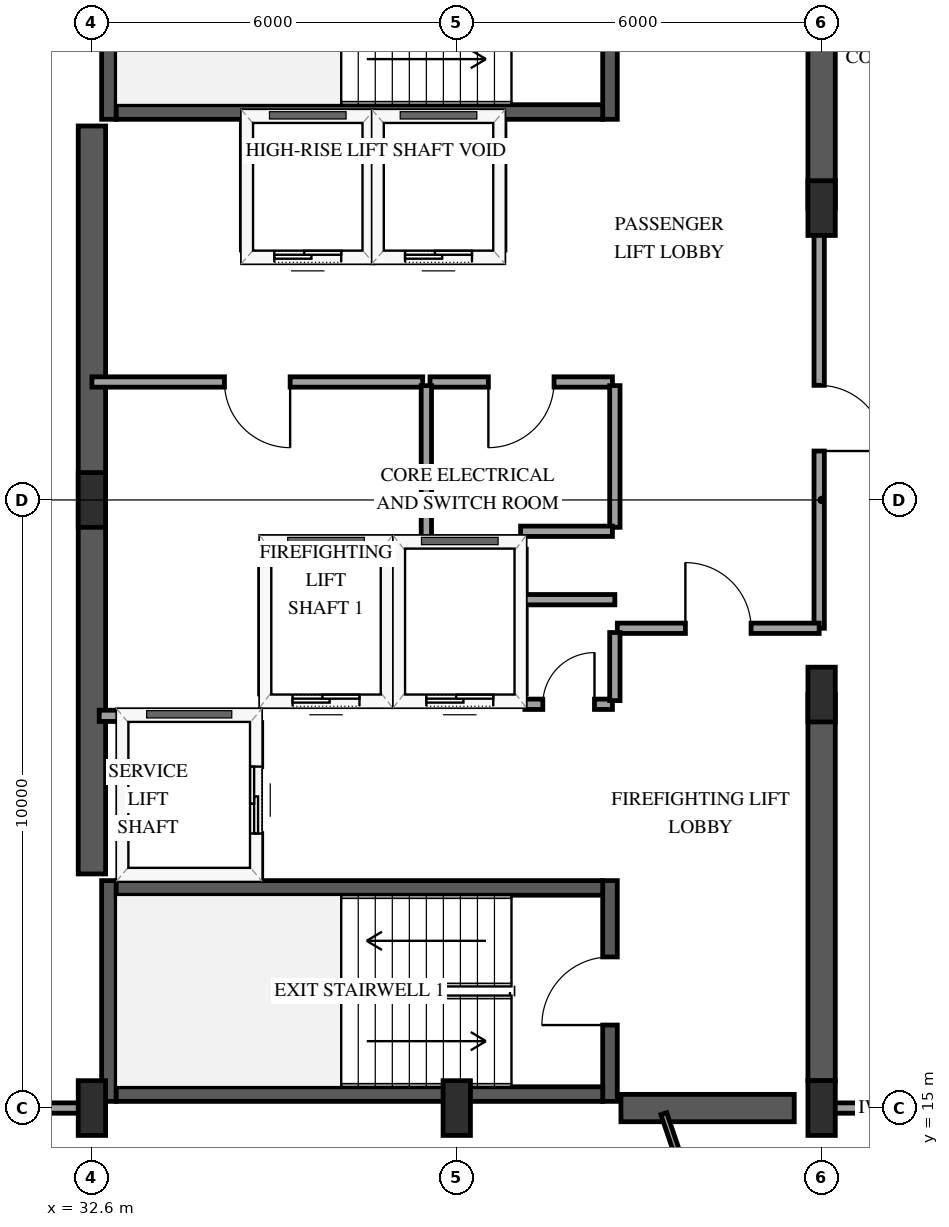
"""IFC4 building model, lengths in metres.
Left out: names, types, materials, properties, quantities, classifications, styles, units other than length and angle.
Written with IfcOpenShell. Run it as: python <this file> out.ifc"""

import sys

from ifc_helpers import new_model, si_unit, direction, frame, frame_2d, origin, origin_2d, place, context, subcontext, project, spatial, rectangle, extrude, element, fill, save


model = new_model("IFC4")
c1 = context("Model", 3, precision=1e-05, world=origin(), true_north=direction((0.0, 1.0)))
c2 = subcontext(c1, "Body", "Model", "MODEL_VIEW")
j1 = project(units=[si_unit("LENGTHUNIT", "METRE"), si_unit("PLANEANGLEUNIT", "RADIAN")], contexts=[c1])
p1 = place(None, origin())
s1 = spatial("IfcSite", under=j1, at=p1, CompositionType="ELEMENT")
p2 = place(p1, origin())
s2 = spatial("IfcBuilding", under=s1, at=p2, CompositionType="ELEMENT")
p3 = place(p2, frame((0.0, 0.0, 276.25)))
s3 = spatial("IfcBuildingStorey", under=s2, at=p3, CompositionType="ELEMENT", Elevation=276.25)
p4 = place(p3, frame((32.88, 15.11, 0.0), z_axis=(0.0, 0.0, 1.0), x_axis=(0.0, 1.0, 0.0)))
e1 = element("IfcWall", 1, at=p4, inside=s3, PredefinedType="SHEAR", context=c2, shape_type="SweptSolid", body=[
    extrude(rectangle(XDim=3.63, YDim=0.24, at=frame_2d((1.815, 0.0))), origin(), (0.0, 0.0, 1.0), 3.75),
])
p5 = place(p3, frame((41.12, 15.11, 0.0), z_axis=(0.0, 0.0, 1.0), x_axis=(0.0, 1.0, 0.0)))
e2 = element("IfcWall", 2, at=p5, inside=s3, PredefinedType="SHEAR", context=c2, shape_type="SweptSolid", body=[
    extrude(rectangle(XDim=3.63, YDim=0.24, at=frame_2d((1.815, 0.0))), origin(), (0.0, 0.0, 1.0), 3.75),
])
p6 = place(p5, frame((1.255, 0.0, 0.0)))
e3 = element("IfcOpeningElement", 3, at=p6, cuts=e2, PredefinedType="OPENING", context=c2, shape_type="SweptSolid", body=[
    extrude(rectangle(XDim=1.12, YDim=2.15, at=frame_2d((0.56, 1.075))), frame((0.0, 0.13, 0.0), z_axis=(0.0, -1.0, 0.0), x_axis=(1.0, 0.0, 0.0)), (0.0, 0.0, 1.0), 0.26),
])
for number, where, z_axis, x_axis in (
    (4, (33.0, 15.23, 0.0), (0.0, 0.0, 1.0), (1.0, 0.0, 0.0)),
    (5, (33.0, 18.62, 0.0), (0.0, 0.0, 1.0), (1.0, 0.0, 0.0)),
):
    element("IfcWall", number, at=place(p3, frame(where, z_axis=z_axis, x_axis=x_axis)), inside=s3, PredefinedType="SHEAR", context=c2, shape_type="SweptSolid", body=[
        extrude(rectangle(XDim=8.0, YDim=0.24, at=frame_2d((4.0, 0.0))), origin(), (0.0, 0.0, 1.0), 3.75),
    ])
p7 = place(p3, frame((32.88, 31.26, 0.0), z_axis=(0.0, 0.0, 1.0), x_axis=(0.0, 1.0, 0.0)))
e6 = element("IfcWall", 6, at=p7, inside=s3, PredefinedType="SHEAR", context=c2, shape_type="SweptSolid", body=[
    extrude(rectangle(XDim=3.63, YDim=0.24, at=frame_2d((1.815, 0.0))), origin(), (0.0, 0.0, 1.0), 3.75),
])
p8 = place(p3, frame((41.12, 31.26, 0.0), z_axis=(0.0, 0.0, 1.0), x_axis=(0.0, 1.0, 0.0)))
e7 = element("IfcWall", 7, at=p8, inside=s3, PredefinedType="SHEAR", context=c2, shape_type="SweptSolid", body=[
    extrude(rectangle(XDim=3.63, YDim=0.24, at=frame_2d((1.815, 0.0))), origin(), (0.0, 0.0, 1.0), 3.75),
])
p9 = place(p8, frame((1.255, 0.0, 0.0)))
e8 = element("IfcOpeningElement", 8, at=p9, cuts=e7, PredefinedType="OPENING", context=c2, shape_type="SweptSolid", body=[
    extrude(rectangle(XDim=1.12, YDim=2.15, at=frame_2d((0.56, 1.075))), frame((0.0, 0.13, 0.0), z_axis=(0.0, -1.0, 0.0), x_axis=(1.0, 0.0, 0.0)), (0.0, 0.0, 1.0), 0.26),
])
p10 = place(p3, frame((33.0, 31.38, 0.0), z_axis=(0.0, 0.0, 1.0), x_axis=(1.0, 0.0, 0.0)))
e9 = element("IfcWall", 9, at=p10, inside=s3, PredefinedType="SHEAR", context=c2, shape_type="SweptSolid", body=[
    extrude(rectangle(XDim=8.0, YDim=0.24, at=frame_2d((4.0, 0.0))), origin(), (0.0, 0.0, 1.0), 3.75),
])
p11 = place(p3, frame((32.6, 18.85, 0.0), z_axis=(0.0, 0.0, 1.0), x_axis=(0.0, 1.0, 0.0)))
e10 = element("IfcWall", 10, at=p11, inside=s3, PredefinedType="SHEAR", context=c2, shape_type="SweptSolid", body=[
    extrude(rectangle(XDim=12.3, YDim=0.45, at=frame_2d((6.15, 0.0))), origin(), (0.0, 0.0, 1.0), 3.75),
])
p12 = place(p3, frame((41.3, 15.0, 0.0), z_axis=(0.0, 0.0, 1.0), x_axis=(1.0, 0.0, 0.0)))
e11 = element("IfcWall", 11, at=p12, inside=s3, PredefinedType="SHEAR", context=c2, shape_type="SweptSolid", body=[
    extrude(rectangle(XDim=2.85, YDim=0.45, at=frame_2d((1.425, 0.0))), origin(), (0.0, 0.0, 1.0), 3.75),
])
p13 = place(p3, frame((44.6, 15.45, 0.0), z_axis=(0.0, 0.0, 1.0), x_axis=(0.0, 1.0, 0.0)))
e12 = element("IfcWall", 12, at=p13, inside=s3, PredefinedType="SHEAR", context=c2, shape_type="SweptSolid", body=[
    extrude(rectangle(XDim=6.35, YDim=0.45, at=frame_2d((3.175, 0.0))), origin(), (0.0, 0.0, 1.0), 3.75),
])
p14 = place(p3, frame((44.6, 29.8, 0.0), z_axis=(0.0, 0.0, 1.0), x_axis=(0.0, 1.0, 0.0)))
e13 = element("IfcWall", 13, at=p14, inside=s3, PredefinedType="SHEAR", context=c2, shape_type="SweptSolid", body=[
    extrude(rectangle(XDim=4.75, YDim=0.45, at=frame_2d((2.375, 0.0))), origin(), (0.0, 0.0, 1.0), 3.75),
])
for number, where, z_axis, x_axis in (
    (14, (32.6, 15.0, 0.0), (0.0, 0.0, 1.0), (1.0, 0.0, 0.0)),
    (15, (32.6, 25.0, 0.0), (0.0, 0.0, 1.0), (1.0, 0.0, 0.0)),
    (16, (38.6, 15.0, 0.0), (0.0, 0.0, 1.0), (1.0, 0.0, 0.0)),
    (17, (44.6, 15.0, 0.0), (0.0, 0.0, 1.0), (1.0, 0.0, 0.0)),
    (18, (44.6, 21.8, 0.0), (0.0, 0.0, 1.0), (1.0, 0.0, 0.0)),
    (19, (44.6, 29.8, 0.0), (0.0, 0.0, 1.0), (1.0, 0.0, 0.0)),
):
    element("IfcColumn", number, at=place(p3, frame(where, z_axis=z_axis, x_axis=x_axis)), inside=s3, PredefinedType="PILASTER", context=c2, shape_type="SweptSolid", body=[
        extrude(rectangle(XDim=0.45, YDim=0.9, at=origin_2d()), origin(), (0.0, 0.0, 1.0), 3.75),
    ])
p15 = place(p3, frame((35.45, 21.7, 0.0), z_axis=(0.0, 0.0, 1.0), x_axis=(1.0, 0.0, 0.0)))
e20 = element("IfcWall", 20, at=p15, inside=s3, PredefinedType="SOLIDWALL", context=c2, shape_type="SweptSolid", body=[
    extrude(rectangle(XDim=2.0, YDim=0.185, at=frame_2d((1.0, 0.0))), origin(), (0.0, 0.0, 1.0), 3.45),
])
p16 = place(p15, frame((0.45, 0.0, 0.0)))
e21 = element("IfcOpeningElement", 21, at=p16, cuts=e20, PredefinedType="OPENING", context=c2, shape_type="SweptSolid", body=[
    extrude(rectangle(XDim=1.1, YDim=2.15, at=frame_2d((0.55, 1.075))), frame((0.0, 0.103, 0.0), z_axis=(0.0, -1.0, 0.0), x_axis=(1.0, 0.0, 0.0)), (0.0, 0.0, 1.0), 0.205),
])
p17 = place(p3, frame((35.45, 24.3, 0.0), z_axis=(0.0, 0.0, 1.0), x_axis=(1.0, 0.0, 0.0)))
e22 = element("IfcWall", 22, at=p17, inside=s3, PredefinedType="SOLIDWALL", context=c2, shape_type="SweptSolid", body=[
    extrude(rectangle(XDim=2.0, YDim=0.185, at=frame_2d((1.0, 0.0))), origin(), (0.0, 0.0, 1.0), 3.45),
])
for number, where, z_axis, x_axis in (
    (23, (35.45, 21.81, 0.0), (0.0, 0.0, 1.0), (0.0, 1.0, 0.0)),
    (24, (37.45, 21.81, 0.0), (0.0, 0.0, 1.0), (0.0, 1.0, 0.0)),
):
    element("IfcWall", number, at=place(p3, frame(where, z_axis=z_axis, x_axis=x_axis)), inside=s3, PredefinedType="SOLIDWALL", context=c2, shape_type="SweptSolid", body=[
        extrude(rectangle(XDim=2.38, YDim=0.185, at=frame_2d((1.19, 0.0))), origin(), (0.0, 0.0, 1.0), 3.45),
    ])
p18 = place(p3, frame((37.65, 21.7, 0.0), z_axis=(0.0, 0.0, 1.0), x_axis=(1.0, 0.0, 0.0)))
e25 = element("IfcWall", 25, at=p18, inside=s3, PredefinedType="SOLIDWALL", context=c2, shape_type="SweptSolid", body=[
    extrude(rectangle(XDim=2.0, YDim=0.185, at=frame_2d((1.0, 0.0))), origin(), (0.0, 0.0, 1.0), 3.45),
])
p19 = place(p18, frame((0.45, 0.0, 0.0)))
e26 = element("IfcOpeningElement", 26, at=p19, cuts=e25, PredefinedType="OPENING", context=c2, shape_type="SweptSolid", body=[
    extrude(rectangle(XDim=1.1, YDim=2.15, at=frame_2d((0.55, 1.075))), frame((0.0, 0.103, 0.0), z_axis=(0.0, -1.0, 0.0), x_axis=(1.0, 0.0, 0.0)), (0.0, 0.0, 1.0), 0.205),
])
p20 = place(p3, frame((37.65, 24.3, 0.0), z_axis=(0.0, 0.0, 1.0), x_axis=(1.0, 0.0, 0.0)))
e27 = element("IfcWall", 27, at=p20, inside=s3, PredefinedType="SOLIDWALL", context=c2, shape_type="SweptSolid", body=[
    extrude(rectangle(XDim=2.0, YDim=0.185, at=frame_2d((1.0, 0.0))), origin(), (0.0, 0.0, 1.0), 3.45),
])
p21 = place(p3, frame((39.65, 21.81, 0.0), z_axis=(0.0, 0.0, 1.0), x_axis=(0.0, 1.0, 0.0)))
e28 = element("IfcWall", 28, at=p21, inside=s3, PredefinedType="SOLIDWALL", context=c2, shape_type="SweptSolid", body=[
    extrude(rectangle(XDim=2.38, YDim=0.185, at=frame_2d((1.19, 0.0))), origin(), (0.0, 0.0, 1.0), 3.45),
])
p22 = place(p3, frame((32.72, 21.45, 0.0), z_axis=(0.0, 0.0, 1.0), x_axis=(1.0, 0.0, 0.0)))
e29 = element("IfcWall", 29, at=p22, inside=s3, PredefinedType="SOLIDWALL", context=c2, shape_type="SweptSolid", body=[
    extrude(rectangle(XDim=2.58, YDim=0.185, at=frame_2d((1.29, 0.0))), origin(), (0.0, 0.0, 1.0), 3.45),
])
p23 = place(p3, frame((35.3, 18.79, 0.0), z_axis=(0.0, 0.0, 1.0), x_axis=(0.0, 1.0, 0.0)))
e30 = element("IfcWall", 30, at=p23, inside=s3, PredefinedType="SOLIDWALL", context=c2, shape_type="SweptSolid", body=[
    extrude(rectangle(XDim=2.55, YDim=0.185, at=frame_2d((1.275, 0.0))), origin(), (0.0, 0.0, 1.0), 3.45),
])
p24 = place(p23, frame((0.725, 0.0, 0.0)))
e31 = element("IfcOpeningElement", 31, at=p24, cuts=e30, PredefinedType="OPENING", context=c2, shape_type="SweptSolid", body=[
    extrude(rectangle(XDim=1.1, YDim=2.15, at=frame_2d((0.55, 1.075))), frame((0.0, 0.103, 0.0), z_axis=(0.0, -1.0, 0.0), x_axis=(1.0, 0.0, 0.0)), (0.0, 0.0, 1.0), 0.205),
])
p25 = place(p3, frame((35.15, 29.0, 0.0), z_axis=(0.0, 0.0, 1.0), x_axis=(1.0, 0.0, 0.0)))
e32 = element("IfcWall", 32, at=p25, inside=s3, PredefinedType="SOLIDWALL", context=c2, shape_type="SweptSolid", body=[
    extrude(rectangle(XDim=2.0, YDim=0.185, at=frame_2d((1.0, 0.0))), origin(), (0.0, 0.0, 1.0), 3.45),
])
p26 = place(p25, frame((0.45, 0.0, 0.0)))
e33 = element("IfcOpeningElement", 33, at=p26, cuts=e32, PredefinedType="OPENING", context=c2, shape_type="SweptSolid", body=[
    extrude(rectangle(XDim=1.1, YDim=2.15, at=frame_2d((0.55, 1.075))), frame((0.0, 0.103, 0.0), z_axis=(0.0, -1.0, 0.0), x_axis=(1.0, 0.0, 0.0)), (0.0, 0.0, 1.0), 0.205),
])
for number, where, z_axis, x_axis in (
    (34, (35.15, 29.11, 0.0), (0.0, 0.0, 1.0), (0.0, 1.0, 0.0)),
    (35, (37.15, 29.11, 0.0), (0.0, 0.0, 1.0), (0.0, 1.0, 0.0)),
):
    element("IfcWall", number, at=place(p3, frame(where, z_axis=z_axis, x_axis=x_axis)), inside=s3, PredefinedType="SOLIDWALL", context=c2, shape_type="SweptSolid", body=[
        extrude(rectangle(XDim=2.1, YDim=0.185, at=frame_2d((1.05, 0.0))), origin(), (0.0, 0.0, 1.0), 3.45),
    ])
p27 = place(p3, frame((37.3, 29.0, 0.0), z_axis=(0.0, 0.0, 1.0), x_axis=(1.0, 0.0, 0.0)))
e36 = element("IfcWall", 36, at=p27, inside=s3, PredefinedType="SOLIDWALL", context=c2, shape_type="SweptSolid", body=[
    extrude(rectangle(XDim=2.0, YDim=0.185, at=frame_2d((1.0, 0.0))), origin(), (0.0, 0.0, 1.0), 3.45),
])
p28 = place(p27, frame((0.45, 0.0, 0.0)))
e37 = element("IfcOpeningElement", 37, at=p28, cuts=e36, PredefinedType="OPENING", context=c2, shape_type="SweptSolid", body=[
    extrude(rectangle(XDim=1.1, YDim=2.15, at=frame_2d((0.55, 1.075))), frame((0.0, 0.103, 0.0), z_axis=(0.0, -1.0, 0.0), x_axis=(1.0, 0.0, 0.0)), (0.0, 0.0, 1.0), 0.205),
])
p29 = place(p3, frame((39.3, 29.11, 0.0), z_axis=(0.0, 0.0, 1.0), x_axis=(0.0, 1.0, 0.0)))
e38 = element("IfcWall", 38, at=p29, inside=s3, PredefinedType="SOLIDWALL", context=c2, shape_type="SweptSolid", body=[
    extrude(rectangle(XDim=2.1, YDim=0.185, at=frame_2d((1.05, 0.0))), origin(), (0.0, 0.0, 1.0), 3.45),
])
p30 = place(p3, frame((42.005, 14.908, 0.0), z_axis=(0.0, 0.0, 1.0), x_axis=(0.319703500681, -0.947517636592, 0.0)))
e39 = element("IfcWall", 39, at=p30, inside=s3, PredefinedType="PARTITIONING", context=c2, shape_type="SweptSolid", body=[
    extrude(rectangle(XDim=8.276, YDim=0.1, at=frame_2d((4.138, 0.0))), origin(), (0.0, 0.0, 1.0), 2.745),
])
p31 = place(p3, frame((44.56, 29.8, 0.0), z_axis=(0.0, 0.0, 1.0), x_axis=(0.0, -1.0, 0.0)))
e40 = element("IfcWall", 40, at=p31, inside=s3, PredefinedType="PARTITIONING", context=c2, shape_type="SweptSolid", body=[
    extrude(rectangle(XDim=6.91, YDim=0.17, at=frame_2d((3.455, 0.0))), origin(), (0.0, 0.0, 1.0), 2.49),
])
p32 = place(p31, frame((2.915, 0.0, 0.0)))
e41 = element("IfcOpeningElement", 41, at=p32, cuts=e40, PredefinedType="OPENING", context=c2, shape_type="SweptSolid", body=[
    extrude(rectangle(XDim=1.08, YDim=2.15, at=frame_2d((0.54, 1.075))), frame((0.0, 0.095, 0.0), z_axis=(0.0, -1.0, 0.0), x_axis=(1.0, 0.0, 0.0)), (0.0, 0.0, 1.0), 0.19),
])
p33 = place(p3, frame((38.04, 26.94, 0.0), z_axis=(0.0, 0.0, 1.0), x_axis=(-1.0, 0.0, 0.0)))
e42 = element("IfcWall", 42, at=p33, inside=s3, PredefinedType="PARTITIONING", context=c2, shape_type="SweptSolid", body=[
    extrude(rectangle(XDim=5.44, YDim=0.17, at=frame_2d((2.72, 0.0))), origin(), (0.0, 0.0, 1.0), 3.45),
])
p34 = place(p33, frame((2.18, 0.0, 0.0)))
e43 = element("IfcOpeningElement", 43, at=p34, cuts=e42, PredefinedType="OPENING", context=c2, shape_type="SweptSolid", body=[
    extrude(rectangle(XDim=1.08, YDim=2.15, at=frame_2d((0.54, 1.075))), frame((0.0, 0.095, 0.0), z_axis=(0.0, -1.0, 0.0), x_axis=(1.0, 0.0, 0.0)), (0.0, 0.0, 1.0), 0.19),
])
p35 = place(p3, frame((41.24, 22.89, 0.0), z_axis=(0.0, 0.0, 1.0), x_axis=(1.0, 0.0, 0.0)))
e44 = element("IfcWall", 44, at=p35, inside=s3, PredefinedType="PARTITIONING", context=c2, shape_type="SweptSolid", body=[
    extrude(rectangle(XDim=3.32, YDim=0.17, at=frame_2d((1.66, 0.0))), origin(), (0.0, 0.0, 1.0), 3.45),
])
p36 = place(p35, frame((1.12, 0.0, 0.0)))
e45 = element("IfcOpeningElement", 45, at=p36, cuts=e44, PredefinedType="OPENING", context=c2, shape_type="SweptSolid", body=[
    extrude(rectangle(XDim=1.08, YDim=2.15, at=frame_2d((0.54, 1.075))), frame((0.0, 0.095, 0.0), z_axis=(0.0, -1.0, 0.0), x_axis=(1.0, 0.0, 0.0)), (0.0, 0.0, 1.0), 0.19),
])
p37 = place(p3, frame((32.53, 15.0, 0.0), z_axis=(0.0, 0.0, 1.0), x_axis=(-1.0, 0.0, 0.0)))
e46 = element("IfcWall", 46, at=p37, inside=s3, PredefinedType="PARTITIONING", context=c2, shape_type="SweptSolid", body=[
    extrude(rectangle(XDim=3.025, YDim=0.17, at=frame_2d((1.513, 0.0))), origin(), (0.0, 0.0, 1.0), 3.45),
])
p38 = place(p3, frame((41.16, 26.94, 0.0), z_axis=(0.0, 0.0, 1.0), x_axis=(-1.0, 0.0, 0.0)))
e47 = element("IfcWall", 47, at=p38, inside=s3, PredefinedType="PARTITIONING", context=c2, shape_type="SweptSolid", body=[
    extrude(rectangle(XDim=3.0, YDim=0.17, at=frame_2d((1.5, 0.0))), origin(), (0.0, 0.0, 1.0), 3.45),
])
p39 = place(p38, frame((0.96, 0.0, 0.0)))
e48 = element("IfcOpeningElement", 48, at=p39, cuts=e47, PredefinedType="OPENING", context=c2, shape_type="SweptSolid", body=[
    extrude(rectangle(XDim=1.08, YDim=2.15, at=frame_2d((0.54, 1.075))), frame((0.0, 0.095, 0.0), z_axis=(0.0, -1.0, 0.0), x_axis=(1.0, 0.0, 0.0)), (0.0, 0.0, 1.0), 0.19),
])
p40 = place(p3, frame((38.1, 26.88, 0.0), z_axis=(0.0, 0.0, 1.0), x_axis=(0.0, -1.0, 0.0)))
e49 = element("IfcWall", 49, at=p40, inside=s3, PredefinedType="PARTITIONING", context=c2, shape_type="SweptSolid", body=[
    extrude(rectangle(XDim=2.58, YDim=0.17, at=frame_2d((1.29, 0.0))), origin(), (0.0, 0.0, 1.0), 3.45),
])
p41 = place(p3, frame((41.2, 24.55, 0.0), z_axis=(0.0, 0.0, 1.0), x_axis=(0.0, 1.0, 0.0)))
e50 = element("IfcWall", 50, at=p41, inside=s3, PredefinedType="PARTITIONING", context=c2, shape_type="SweptSolid", body=[
    extrude(rectangle(XDim=2.33, YDim=0.17, at=frame_2d((1.165, 0.0))), origin(), (0.0, 0.0, 1.0), 3.45),
])
p42 = place(p3, frame((46.58, 15.0, 0.0), z_axis=(0.0, 0.0, 1.0), x_axis=(-1.0, 0.0, 0.0)))
e51 = element("IfcWall", 51, at=p42, inside=s3, PredefinedType="PARTITIONING", context=c2, shape_type="SweptSolid", body=[
    extrude(rectangle(XDim=1.91, YDim=0.17, at=frame_2d((0.955, 0.0))), origin(), (0.0, 0.0, 1.0), 3.45),
])
p43 = place(p3, frame((39.65, 24.485, 0.0), z_axis=(0.0, 0.0, 1.0), x_axis=(1.0, 0.0, 0.0)))
e52 = element("IfcWall", 52, at=p43, inside=s3, PredefinedType="PARTITIONING", context=c2, shape_type="SweptSolid", body=[
    extrude(rectangle(XDim=1.51, YDim=0.17, at=frame_2d((0.755, 0.0))), origin(), (0.0, 0.0, 1.0), 3.45),
])
p44 = place(p3, frame((39.72, 21.64, 0.0), z_axis=(0.0, 0.0, 1.0), x_axis=(1.0, 0.0, 0.0)))
e53 = element("IfcWall", 53, at=p44, inside=s3, PredefinedType="PARTITIONING", context=c2, shape_type="SweptSolid", body=[
    extrude(rectangle(XDim=1.44, YDim=0.17, at=frame_2d((0.72, 0.0))), origin(), (0.0, 0.0, 1.0), 3.45),
])
p45 = place(p44, frame((0.295, 0.0, 0.0)))
e54 = element("IfcOpeningElement", 54, at=p45, cuts=e53, PredefinedType="OPENING", context=c2, shape_type="SweptSolid", body=[
    extrude(rectangle(XDim=0.85, YDim=2.1, at=frame_2d((0.425, 1.05))), frame((0.0, 0.095, 0.0), z_axis=(0.0, -1.0, 0.0), x_axis=(1.0, 0.0, 0.0)), (0.0, 0.0, 1.0), 0.19),
])
p46 = place(p3, frame((41.2, 21.7, 0.0), z_axis=(0.0, 0.0, 1.0), x_axis=(0.0, 1.0, 0.0)))
e55 = element("IfcWall", 55, at=p46, inside=s3, PredefinedType="PARTITIONING", context=c2, shape_type="SweptSolid", body=[
    extrude(rectangle(XDim=1.12, YDim=0.17, at=frame_2d((0.56, 0.0))), origin(), (0.0, 0.0, 1.0), 3.45),
])
p47 = place(p3, frame((41.2, 23.36, 0.0), z_axis=(0.0, 0.0, 1.0), x_axis=(-1.0, 0.0, 0.0)))
e56 = element("IfcWall", 56, at=p47, inside=s3, PredefinedType="PARTITIONING", context=c2, shape_type="SweptSolid", body=[
    extrude(rectangle(XDim=1.48, YDim=0.17, at=frame_2d((0.74, 0.0))), origin(), (0.0, 0.0, 1.0), 3.45),
])
p48 = place(p16, origin())
e57 = element("IfcDoor", 57, at=p48, inside=s3, OperationType="SLIDING_TO_LEFT", PredefinedType="DOOR", context=c2, shape_type="SweptSolid", body=[
    extrude(rectangle(XDim=1.1, YDim=2.15, at=frame_2d((0.55, 1.075))), frame((0.0, 0.025, 0.0), z_axis=(0.0, -1.0, 0.0), x_axis=(1.0, 0.0, 0.0)), (0.0, 0.0, 1.0), 0.05),
])
fill(e21, e57)
p49 = place(p19, origin())
e58 = element("IfcDoor", 58, at=p49, inside=s3, OperationType="SLIDING_TO_LEFT", PredefinedType="DOOR", context=c2, shape_type="SweptSolid", body=[
    extrude(rectangle(XDim=1.1, YDim=2.15, at=frame_2d((0.55, 1.075))), frame((0.0, 0.025, 0.0), z_axis=(0.0, -1.0, 0.0), x_axis=(1.0, 0.0, 0.0)), (0.0, 0.0, 1.0), 0.05),
])
fill(e26, e58)
p50 = place(p24, origin())
e59 = element("IfcDoor", 59, at=p50, inside=s3, OperationType="SLIDING_TO_LEFT", PredefinedType="DOOR", context=c2, shape_type="SweptSolid", body=[
    extrude(rectangle(XDim=1.1, YDim=2.15, at=frame_2d((0.55, 1.075))), frame((0.0, 0.025, 0.0), z_axis=(0.0, -1.0, 0.0), x_axis=(1.0, 0.0, 0.0)), (0.0, 0.0, 1.0), 0.05),
])
fill(e31, e59)
p51 = place(p26, origin())
e60 = element("IfcDoor", 60, at=p51, inside=s3, OperationType="SLIDING_TO_LEFT", PredefinedType="DOOR", context=c2, shape_type="SweptSolid", body=[
    extrude(rectangle(XDim=1.1, YDim=2.15, at=frame_2d((0.55, 1.075))), frame((0.0, 0.025, 0.0), z_axis=(0.0, -1.0, 0.0), x_axis=(1.0, 0.0, 0.0)), (0.0, 0.0, 1.0), 0.05),
])
fill(e33, e60)
p52 = place(p28, origin())
e61 = element("IfcDoor", 61, at=p52, inside=s3, OperationType="SLIDING_TO_LEFT", PredefinedType="DOOR", context=c2, shape_type="SweptSolid", body=[
    extrude(rectangle(XDim=1.1, YDim=2.15, at=frame_2d((0.55, 1.075))), frame((0.0, 0.025, 0.0), z_axis=(0.0, -1.0, 0.0), x_axis=(1.0, 0.0, 0.0)), (0.0, 0.0, 1.0), 0.05),
])
fill(e37, e61)
p53 = place(p6, origin())
e62 = element("IfcDoor", 62, at=p53, inside=s3, OperationType="SINGLE_SWING_LEFT", PredefinedType="DOOR", context=c2, shape_type="SweptSolid", body=[
    extrude(rectangle(XDim=1.12, YDim=2.15, at=frame_2d((0.56, 1.075))), frame((0.0, 0.025, 0.0), z_axis=(0.0, -1.0, 0.0), x_axis=(1.0, 0.0, 0.0)), (0.0, 0.0, 1.0), 0.05),
])
fill(e3, e62)
p54 = place(p32, origin())
e63 = element("IfcDoor", 63, at=p54, inside=s3, OperationType="SINGLE_SWING_RIGHT", PredefinedType="DOOR", context=c2, shape_type="SweptSolid", body=[
    extrude(rectangle(XDim=1.08, YDim=2.15, at=frame_2d((0.54, 1.075))), frame((0.0, 0.025, 0.0), z_axis=(0.0, -1.0, 0.0), x_axis=(1.0, 0.0, 0.0)), (0.0, 0.0, 1.0), 0.05),
])
fill(e41, e63)
p55 = place(p34, origin())
e64 = element("IfcDoor", 64, at=p55, inside=s3, OperationType="SINGLE_SWING_LEFT", PredefinedType="DOOR", context=c2, shape_type="SweptSolid", body=[
    extrude(rectangle(XDim=1.08, YDim=2.15, at=frame_2d((0.54, 1.075))), frame((0.0, 0.025, 0.0), z_axis=(0.0, -1.0, 0.0), x_axis=(1.0, 0.0, 0.0)), (0.0, 0.0, 1.0), 0.05),
])
fill(e43, e64)
p56 = place(p36, origin())
e65 = element("IfcDoor", 65, at=p56, inside=s3, OperationType="SINGLE_SWING_LEFT", PredefinedType="DOOR", context=c2, shape_type="SweptSolid", body=[
    extrude(rectangle(XDim=1.08, YDim=2.15, at=frame_2d((0.54, 1.075))), frame((0.0, 0.025, 0.0), z_axis=(0.0, -1.0, 0.0), x_axis=(1.0, 0.0, 0.0)), (0.0, 0.0, 1.0), 0.05),
])
fill(e45, e65)
p57 = place(p39, origin())
e66 = element("IfcDoor", 66, at=p57, inside=s3, OperationType="SINGLE_SWING_RIGHT", PredefinedType="DOOR", context=c2, shape_type="SweptSolid", body=[
    extrude(rectangle(XDim=1.08, YDim=2.15, at=frame_2d((0.54, 1.075))), frame((0.0, 0.025, 0.0), z_axis=(0.0, -1.0, 0.0), x_axis=(1.0, 0.0, 0.0)), (0.0, 0.0, 1.0), 0.05),
])
fill(e48, e66)
p58 = place(p45, origin())
e67 = element("IfcDoor", 67, at=p58, inside=s3, OperationType="SINGLE_SWING_RIGHT", PredefinedType="DOOR", context=c2, shape_type="SweptSolid", body=[
    extrude(rectangle(XDim=0.85, YDim=2.1, at=frame_2d((0.425, 1.05))), frame((0.0, 0.025, 0.0), z_axis=(0.0, -1.0, 0.0), x_axis=(1.0, 0.0, 0.0)), (0.0, 0.0, 1.0), 0.05),
])
fill(e54, e67)
save(model, sys.argv[1])
